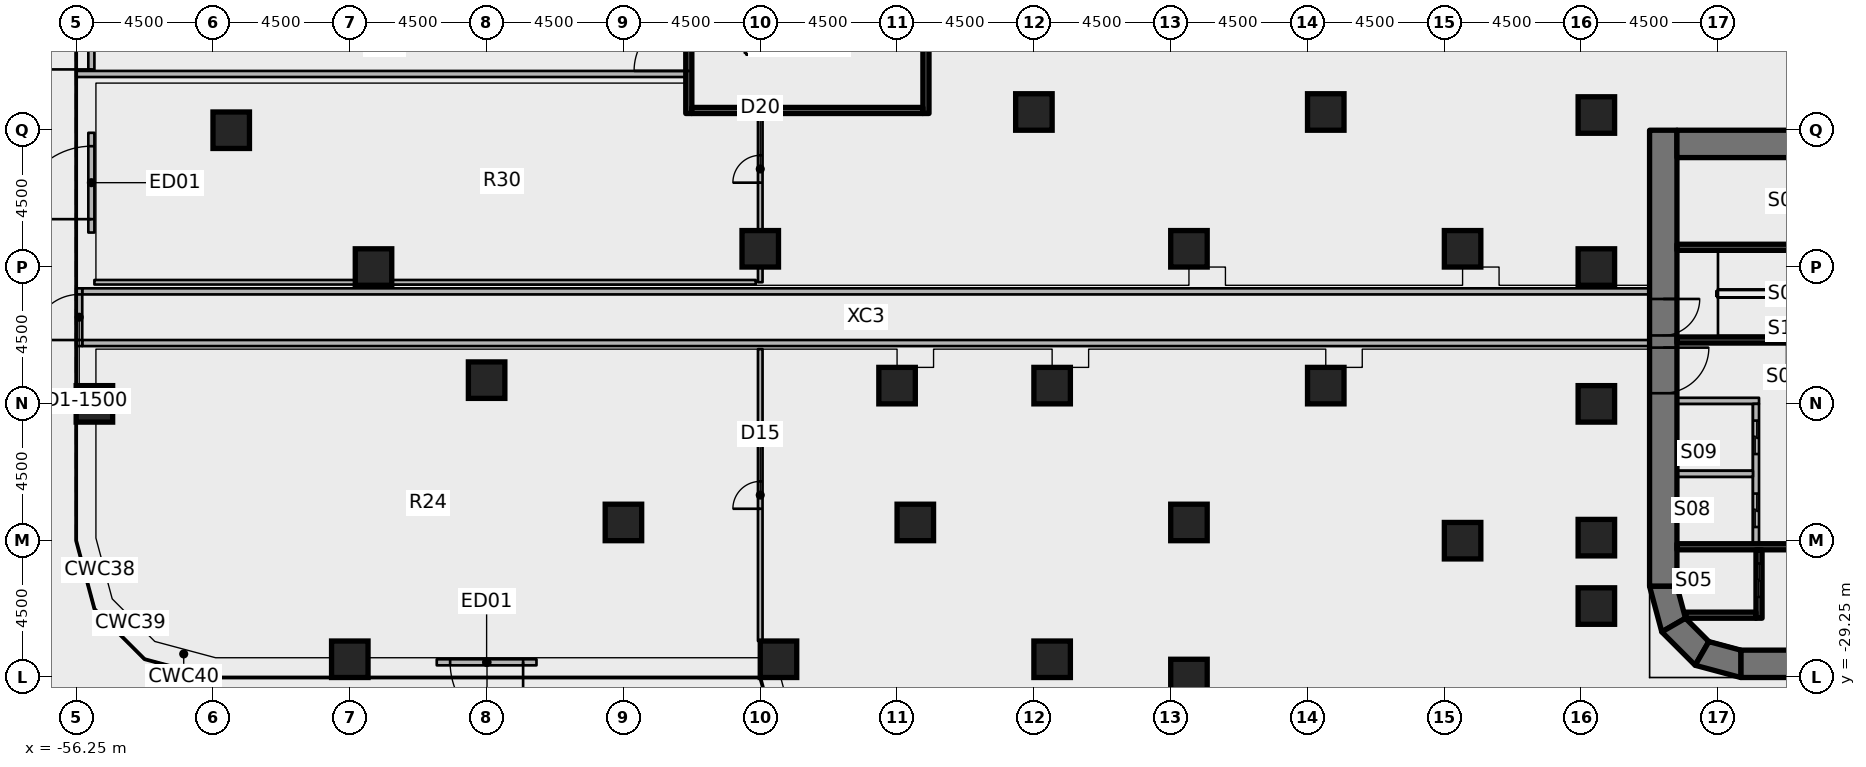
"""IFC4 building model, lengths in metres.
Left out: names, types, materials, properties, quantities, classifications, styles, units other than length and angle.
Written with IfcOpenShell. Run it as: python <this file> out.ifc"""

import sys

from ifc_helpers import new_model, si_unit, direction, frame, frame_2d, origin, origin_2d, place, context, subcontext, project, spatial, polyline, rectangle, outline, extrude, element, fill, save


model = new_model("IFC4")
c1 = context("Model", 3, precision=1e-05, world=origin(), true_north=direction((0.0, 1.0)))
c2 = subcontext(c1, "Body", "Model", "MODEL_VIEW")
j1 = project(units=[si_unit("LENGTHUNIT", "METRE"), si_unit("PLANEANGLEUNIT", "RADIAN")], contexts=[c1])
p1 = place(None, origin())
s1 = spatial("IfcSite", under=j1, at=p1, CompositionType="ELEMENT")
p2 = place(p1, origin())
s2 = spatial("IfcBuilding", under=s1, at=p2, CompositionType="ELEMENT")
p3 = place(p2, origin())
s3 = spatial("IfcBuildingStorey", under=s2, at=p3, CompositionType="ELEMENT", Elevation=0.0)
for number, where, z_axis, x_axis in (
    (1, (-55.65, -20.25, 0.0), (0.0, 0.0, 1.0), (1.0, 0.0, 0.0)),
    (2, (-51.15, -11.25, 0.0), (0.0, 0.0, 1.0), (1.0, 0.0, 0.0)),
    (3, (-47.25, -28.65, 0.0), (0.0, 0.0, 1.0), (1.0, 0.0, 0.0)),
    (4, (-46.47, -15.75, 0.0), (0.0, 0.0, 1.0), (1.0, 0.0, 0.0)),
    (5, (-42.75, -19.47, 0.0), (0.0, 0.0, 1.0), (1.0, 0.0, 0.0)),
    (6, (-38.25, -24.15, 0.0), (0.0, 0.0, 1.0), (1.0, 0.0, 0.0)),
    (7, (-33.15, -28.65, 0.0), (0.0, 0.0, 1.0), (1.0, 0.0, 0.0)),
    (8, (-33.75, -15.15, 0.0), (0.0, 0.0, 1.0), (1.0, 0.0, 0.0)),
    (9, (-28.65, -24.15, 0.0), (0.0, 0.0, 1.0), (1.0, 0.0, 0.0)),
    (10, (-29.25, -19.65, 0.0), (0.0, 0.0, 1.0), (1.0, 0.0, 0.0)),
    (11, (-24.15, -28.65, 0.0), (0.0, 0.0, 1.0), (1.0, 0.0, 0.0)),
    (12, (-24.15, -19.65, 0.0), (0.0, 0.0, 1.0), (1.0, 0.0, 0.0)),
    (13, (-24.75, -10.65, 0.0), (0.0, 0.0, 1.0), (1.0, 0.0, 0.0)),
    (14, (-19.65, -29.25, 0.0), (0.0, 0.0, 1.0), (1.0, 0.0, 0.0)),
    (15, (-19.65, -24.15, 0.0), (0.0, 0.0, 1.0), (1.0, 0.0, 0.0)),
    (16, (-19.65, -15.15, 0.0), (0.0, 0.0, 1.0), (1.0, 0.0, 0.0)),
    (17, (-15.15, -19.65, 0.0), (0.0, 0.0, 1.0), (1.0, 0.0, 0.0)),
    (18, (-15.15, -10.65, 0.0), (0.0, 0.0, 1.0), (1.0, 0.0, 0.0)),
    (19, (-10.65, -24.75, 0.0), (0.0, 0.0, 1.0), (1.0, 0.0, 0.0)),
    (20, (-10.65, -15.15, 0.0), (0.0, 0.0, 1.0), (1.0, 0.0, 0.0)),
    (21, (-6.25, -26.9, 0.0), (0.0, 0.0, 1.0), (1.0, 0.0, 0.0)),
    (22, (-6.25, -24.65, 0.0), (0.0, 0.0, 1.0), (1.0, 0.0, 0.0)),
    (23, (-6.25, -20.25, 0.0), (0.0, 0.0, 1.0), (1.0, 0.0, 0.0)),
    (24, (-6.25, -15.75, 0.0), (0.0, 0.0, 1.0), (1.0, 0.0, 0.0)),
    (25, (-6.25, -10.75, 0.0), (0.0, 0.0, 1.0), (1.0, 0.0, 0.0)),
):
    element("IfcColumn", number, at=place(p3, frame(where, z_axis=z_axis, x_axis=x_axis)), inside=s3, PredefinedType="COLUMN", context=c2, shape_type="SweptSolid", body=[
        extrude(rectangle(XDim=1.2, YDim=1.2, at=origin_2d()), origin(), (0.0, 0.0, 1.0), 6.55),
    ])
p4 = place(p3, frame((-4.05, -11.25, 0.0), z_axis=(0.0, 0.0, 1.0), x_axis=(0.0, -1.0, 0.0)))
e26 = element("IfcWall", 26, at=p4, inside=s3, PredefinedType="SHEAR", context=c2, shape_type="SweptSolid", body=[
    extrude(rectangle(XDim=15.0, YDim=0.9, at=frame_2d((7.5, 0.0))), origin(), (0.0, 0.0, 1.0), 7.0),
])
p5 = place(p4, frame((7.15, 0.0, 0.0)))
e27 = element("IfcOpeningElement", 27, at=p5, cuts=e26, PredefinedType="OPENING", context=c2, shape_type="SweptSolid", body=[
    extrude(rectangle(XDim=1.5, YDim=2.3, at=frame_2d((0.75, 1.15))), frame((0.0, 0.46, 0.0), z_axis=(0.0, -1.0, 0.0), x_axis=(1.0, 0.0, 0.0)), (0.0, 0.0, 1.0), 0.92),
])
p6 = place(p4, frame((5.55, 0.0, 0.0)))
e28 = element("IfcOpeningElement", 28, at=p6, cuts=e26, PredefinedType="OPENING", context=c2, shape_type="SweptSolid", body=[
    extrude(rectangle(XDim=1.2, YDim=2.1, at=frame_2d((0.6, 1.05))), frame((0.0, 0.46, 0.0), z_axis=(0.0, -1.0, 0.0), x_axis=(1.0, 0.0, 0.0)), (0.0, 0.0, 1.0), 0.92),
])
p7 = place(p3, frame((-3.6, -11.7, 0.0), z_axis=(0.0, 0.0, 1.0), x_axis=(1.0, 0.0, 0.0)))
e29 = element("IfcWall", 29, at=p7, inside=s3, PredefinedType="SHEAR", context=c2, shape_type="SweptSolid", body=[
    extrude(rectangle(XDim=7.2, YDim=0.9, at=frame_2d((3.6, 0.0))), origin(), (0.0, 0.0, 1.0), 7.0),
])
p8 = place(p3, frame((-1.5, -28.8, 0.0), z_axis=(0.0, 0.0, 1.0), x_axis=(1.0, 0.0, 0.0)))
e30 = element("IfcWall", 30, at=p8, inside=s3, PredefinedType="SHEAR", context=c2, shape_type="SweptSolid", body=[
    extrude(rectangle(XDim=3.0, YDim=0.9, at=frame_2d((1.5, 0.0))), origin(), (0.0, 0.0, 1.0), 7.0),
])
p9 = place(p3, origin())
e31 = element("IfcWall", 31, at=p9, inside=s3, PredefinedType="SHEAR", context=c2, shape_type="SweptSolid", body=[
    extrude(outline(polyline([(-4.5, -26.25), (-4.098, -27.75), (-3.319, -27.3), (-3.6, -26.25), (-4.5, -26.25)])), origin(), (0.0, 0.0, 1.0), 7.0),
])
p10 = place(p3, origin())
e32 = element("IfcWall", 32, at=p10, inside=s3, PredefinedType="SHEAR", context=c2, shape_type="SweptSolid", body=[
    extrude(outline(polyline([(-4.098, -27.75), (-3.0, -28.848), (-2.55, -28.069), (-3.319, -27.3), (-4.098, -27.75)])), origin(), (0.0, 0.0, 1.0), 7.0),
])
p11 = place(p3, origin())
e33 = element("IfcWall", 33, at=p11, inside=s3, PredefinedType="SHEAR", context=c2, shape_type="SweptSolid", body=[
    extrude(outline(polyline([(-3.0, -28.848), (-1.5, -29.25), (-1.5, -28.35), (-2.55, -28.069), (-3.0, -28.848)])), origin(), (0.0, 0.0, 1.0), 7.0),
])
p12 = place(p3, frame((-41.11, -28.75, 0.0), z_axis=(0.0, 0.0, 1.0), x_axis=(-1.0, 0.0, 0.0)))
e34 = element("IfcWall", 34, at=p12, inside=s3, PredefinedType="SOLIDWALL", context=c2, shape_type="SweptSolid", body=[
    extrude(rectangle(XDim=3.28, YDim=0.2, at=frame_2d((1.64, 0.0))), origin(), (0.0, 0.0, 1.0), 5.6),
])
p13 = place(p12, frame((0.44, 0.0, 0.0)))
e35 = element("IfcOpeningElement", 35, at=p13, cuts=e34, PredefinedType="OPENING", context=c2, shape_type="SweptSolid", body=[
    extrude(rectangle(XDim=2.4, YDim=2.7, at=frame_2d((1.2, 1.35))), frame((0.0, 0.11, 0.0), z_axis=(0.0, -1.0, 0.0), x_axis=(1.0, 0.0, 0.0)), (0.0, 0.0, 1.0), 0.22),
])
p14 = place(p3, frame((-55.75, -14.615, 0.0), z_axis=(0.0, 0.0, 1.0), x_axis=(0.0, 1.0, 0.0)))
e36 = element("IfcWall", 36, at=p14, inside=s3, PredefinedType="SOLIDWALL", context=c2, shape_type="SweptSolid", body=[
    extrude(rectangle(XDim=3.28, YDim=0.2, at=frame_2d((1.64, 0.0))), origin(), (0.0, 0.0, 1.0), 5.6),
])
p15 = place(p14, frame((0.44, 0.0, 0.0)))
e37 = element("IfcOpeningElement", 37, at=p15, cuts=e36, PredefinedType="OPENING", context=c2, shape_type="SweptSolid", body=[
    extrude(rectangle(XDim=2.4, YDim=2.7, at=frame_2d((1.2, 1.35))), frame((0.0, 0.11, 0.0), z_axis=(0.0, -1.0, 0.0), x_axis=(1.0, 0.0, 0.0)), (0.0, 0.0, 1.0), 0.22),
])
p16 = place(p3, frame((-55.75, -9.3, 0.0), z_axis=(0.0, 0.0, 1.0), x_axis=(0.0, 1.0, 0.0)))
e38 = element("IfcWall", 38, at=p16, inside=s3, PredefinedType="SOLIDWALL", context=c2, shape_type="SweptSolid", body=[
    extrude(rectangle(XDim=1.8, YDim=0.2, at=frame_2d((0.9, 0.0))), origin(), (0.0, 0.0, 1.0), 3.0),
])
p17 = place(p16, frame((0.05, 0.0, 0.0)))
e39 = element("IfcOpeningElement", 39, at=p17, cuts=e38, PredefinedType="OPENING", context=c2, shape_type="SweptSolid", body=[
    extrude(rectangle(XDim=1.7, YDim=2.1, at=frame_2d((0.85, 1.05))), frame((0.0, 0.11, 0.0), z_axis=(0.0, -1.0, 0.0), x_axis=(1.0, 0.0, 0.0)), (0.0, 0.0, 1.0), 0.22),
])
p18 = place(p3, frame((3.6, -24.95, 0.0), z_axis=(0.0, 0.0, 1.0), x_axis=(-1.0, 0.0, 0.0)))
e40 = element("IfcWall", 40, at=p18, inside=s3, PredefinedType="SHEAR", context=c2, shape_type="SweptSolid", body=[
    extrude(rectangle(XDim=7.2, YDim=0.2, at=frame_2d((3.6, 0.0))), origin(), (0.0, 0.0, 1.0), 6.55),
])
p19 = place(p3, frame((-0.9, -27.3, 0.0), z_axis=(0.0, 0.0, 1.0), x_axis=(0.0, 1.0, 0.0)))
e41 = element("IfcWall", 41, at=p19, inside=s3, PredefinedType="SHEAR", context=c2, shape_type="SweptSolid", body=[
    extrude(rectangle(XDim=2.25, YDim=0.2, at=frame_2d((1.125, 0.0))), origin(), (0.0, 0.0, 1.0), 6.55),
])
p20 = place(p19, frame((0.7, 0.0, 0.0)))
e42 = element("IfcOpeningElement", 42, at=p20, cuts=e41, PredefinedType="OPENING", context=c2, shape_type="SweptSolid", body=[
    extrude(rectangle(XDim=1.1, YDim=2.3, at=frame_2d((0.55, 1.15))), frame((0.0, 0.11, 0.0), z_axis=(0.0, -1.0, 0.0), x_axis=(1.0, 0.0, 0.0)), (0.0, 0.0, 1.0), 0.22),
])
p21 = place(p3, origin())
e43 = element("IfcWall", 43, at=p21, inside=s3, PredefinedType="SHEAR", context=c2, shape_type="SweptSolid", body=[
    extrude(outline(polyline([(-1.0, -27.1), (-3.341, -27.1), (-3.291, -27.284), (-3.275, -27.3), (-1.0, -27.3), (-1.0, -27.1)])), origin(), (0.0, 0.0, 1.0), 6.55),
])
for number, where, z_axis, x_axis in (
    (44, (3.6, -18.15, 0.0), (0.0, 0.0, 1.0), (-1.0, 0.0, 0.0)),
    (45, (3.6, -15.1, 0.0), (0.0, 0.0, 1.0), (-1.0, 0.0, 0.0)),
):
    element("IfcWall", number, at=place(p3, frame(where, z_axis=z_axis, x_axis=x_axis)), inside=s3, PredefinedType="SHEAR", context=c2, shape_type="SweptSolid", body=[
        extrude(rectangle(XDim=7.2, YDim=0.2, at=frame_2d((3.6, 0.0))), origin(), (0.0, 0.0, 1.0), 6.55),
    ])
p22 = place(p3, frame((-0.9, -20.15, 0.0), z_axis=(0.0, 0.0, 1.0), x_axis=(-1.0, 0.0, 0.0)))
e46 = element("IfcWall", 46, at=p22, inside=s3, PredefinedType="PARTITIONING", context=c2, shape_type="SweptSolid", body=[
    extrude(rectangle(XDim=2.7, YDim=0.2, at=frame_2d((1.35, 0.0))), origin(), (0.0, 0.0, 1.0), 6.55),
])
p23 = place(p3, frame((-1.0, -24.85, 0.0), z_axis=(0.0, 0.0, 1.0), x_axis=(0.0, 1.0, 0.0)))
e47 = element("IfcWall", 47, at=p23, inside=s3, PredefinedType="PARTITIONING", context=c2, shape_type="SweptSolid", body=[
    extrude(rectangle(XDim=4.6, YDim=0.2, at=frame_2d((2.3, 0.0))), origin(), (0.0, 0.0, 1.0), 6.55),
])
p24 = place(p23, frame((0.55, 0.0, 0.0)))
e48 = element("IfcOpeningElement", 48, at=p24, cuts=e47, PredefinedType="OPENING", context=c2, shape_type="SweptSolid", body=[
    extrude(rectangle(XDim=1.1, YDim=2.3, at=frame_2d((0.55, 1.15))), frame((0.0, 0.11, 0.0), z_axis=(0.0, -1.0, 0.0), x_axis=(1.0, 0.0, 0.0)), (0.0, 0.0, 1.0), 0.22),
])
p25 = place(p23, frame((2.95, 0.0, 0.0)))
e49 = element("IfcOpeningElement", 49, at=p25, cuts=e47, PredefinedType="OPENING", context=c2, shape_type="SweptSolid", body=[
    extrude(rectangle(XDim=1.1, YDim=2.3, at=frame_2d((0.55, 1.15))), frame((0.0, 0.11, 0.0), z_axis=(0.0, -1.0, 0.0), x_axis=(1.0, 0.0, 0.0)), (0.0, 0.0, 1.0), 0.22),
])
p26 = place(p3, frame((-1.1, -22.55, 0.0), z_axis=(0.0, 0.0, 1.0), x_axis=(-1.0, 0.0, 0.0)))
e50 = element("IfcWall", 50, at=p26, inside=s3, PredefinedType="PARTITIONING", context=c2, shape_type="SweptSolid", body=[
    extrude(rectangle(XDim=2.5, YDim=0.2, at=frame_2d((1.25, 0.0))), origin(), (0.0, 0.0, 1.0), 6.55),
])
for number, where, z_axis, x_axis in (
    (51, (-4.5, -18.25, 0.0), (0.0, 0.0, 1.0), (-1.0, 0.0, 0.0)),
    (52, (-4.5, -16.55, 0.0), (0.0, 0.0, 1.0), (-1.0, 0.0, 0.0)),
):
    element("IfcWall", number, at=place(p3, frame(where, z_axis=z_axis, x_axis=x_axis)), inside=s3, PredefinedType="PARTITIONING", context=c2, shape_type="SweptSolid", body=[
        extrude(rectangle(XDim=51.55, YDim=0.2, at=frame_2d((25.775, 0.0))), origin(), (0.0, 0.0, 1.0), 6.55),
    ])
p27 = place(p3, frame((-56.15, -18.35, 0.0), z_axis=(0.0, 0.0, 1.0), x_axis=(0.0, 1.0, 0.0)))
e53 = element("IfcWall", 53, at=p27, inside=s3, PredefinedType="PARTITIONING", context=c2, shape_type="SweptSolid", body=[
    extrude(rectangle(XDim=1.9, YDim=0.2, at=frame_2d((0.95, 0.0))), origin(), (0.0, 0.0, 1.0), 6.55),
])
p28 = place(p27, frame((0.2, 0.0, 0.0)))
e54 = element("IfcOpeningElement", 54, at=p28, cuts=e53, PredefinedType="OPENING", context=c2, shape_type="SweptSolid", body=[
    extrude(rectangle(XDim=1.5, YDim=2.1, at=frame_2d((0.75, 1.05))), frame((0.0, 0.11, 0.0), z_axis=(0.0, -1.0, 0.0), x_axis=(1.0, 0.0, 0.0)), (0.0, 0.0, 1.0), 0.22),
])
p29 = place(p3, frame((-36.1, -10.7, 0.0), z_axis=(0.0, 0.0, 1.0), x_axis=(0.0, 1.0, 0.0)))
e55 = element("IfcWall", 55, at=p29, inside=s3, PredefinedType="SHEAR", context=c2, shape_type="SweptSolid", body=[
    extrude(rectangle(XDim=4.6, YDim=0.2, at=frame_2d((2.3, 0.0))), origin(), (0.0, 0.0, 1.0), 6.55),
])
p30 = place(p29, frame((1.4, 0.0, 0.0)))
e56 = element("IfcOpeningElement", 56, at=p30, cuts=e55, PredefinedType="OPENING", context=c2, shape_type="SweptSolid", body=[
    extrude(rectangle(XDim=1.8, YDim=2.1, at=frame_2d((0.9, 1.05))), frame((0.0, 0.11, 0.0), z_axis=(0.0, -1.0, 0.0), x_axis=(1.0, 0.0, 0.0)), (0.0, 0.0, 1.0), 0.22),
])
p31 = place(p3, frame((-28.3, -10.7, 0.0), z_axis=(0.0, 0.0, 1.0), x_axis=(0.0, 1.0, 0.0)))
e57 = element("IfcWall", 57, at=p31, inside=s3, PredefinedType="SHEAR", context=c2, shape_type="SweptSolid", body=[
    extrude(rectangle(XDim=4.6, YDim=0.2, at=frame_2d((2.3, 0.0))), origin(), (0.0, 0.0, 1.0), 6.55),
])
p32 = place(p3, frame((-36.0, -10.6, 0.0), z_axis=(0.0, 0.0, 1.0), x_axis=(1.0, 0.0, 0.0)))
e58 = element("IfcWall", 58, at=p32, inside=s3, PredefinedType="SHEAR", context=c2, shape_type="SweptSolid", body=[
    extrude(rectangle(XDim=7.6, YDim=0.2, at=frame_2d((3.8, 0.0))), origin(), (0.0, 0.0, 1.0), 6.55),
])
p33 = place(p3, frame((-56.25, -9.4, 0.0), z_axis=(0.0, 0.0, 1.0), x_axis=(1.0, 0.0, 0.0)))
e59 = element("IfcWall", 59, at=p33, inside=s3, PredefinedType="PARTITIONING", context=c2, shape_type="SweptSolid", body=[
    extrude(rectangle(XDim=20.25, YDim=0.2, at=frame_2d((10.125, 0.0))), origin(), (0.0, 0.0, 1.0), 6.55),
])
p34 = place(p3, frame((-33.75, -28.05, 0.0), z_axis=(0.0, 0.0, 1.0), x_axis=(0.0, 1.0, 0.0)))
e60 = element("IfcWall", 60, at=p34, inside=s3, PredefinedType="PARTITIONING", context=c2, shape_type="SweptSolid", body=[
    extrude(rectangle(XDim=9.6, YDim=0.15, at=frame_2d((4.8, 0.0))), origin(), (0.0, 0.0, 1.0), 6.55),
])
p35 = place(p34, frame((4.35, 0.0, 0.0)))
e61 = element("IfcOpeningElement", 61, at=p35, cuts=e60, PredefinedType="OPENING", context=c2, shape_type="SweptSolid", body=[
    extrude(rectangle(XDim=0.9, YDim=2.1, at=frame_2d((0.45, 1.05))), frame((0.0, 0.085, 0.0), z_axis=(0.0, -1.0, 0.0), x_axis=(1.0, 0.0, 0.0)), (0.0, 0.0, 1.0), 0.17),
])
p36 = place(p3, frame((-33.75, -14.55, 0.0), z_axis=(0.0, 0.0, 1.0), x_axis=(0.0, 1.0, 0.0)))
e62 = element("IfcWall", 62, at=p36, inside=s3, PredefinedType="PARTITIONING", context=c2, shape_type="SweptSolid", body=[
    extrude(rectangle(XDim=4.05, YDim=0.15, at=frame_2d((2.025, 0.0))), origin(), (0.0, 0.0, 1.0), 6.55),
])
p37 = place(p36, frame((1.575, 0.0, 0.0)))
e63 = element("IfcOpeningElement", 63, at=p37, cuts=e62, PredefinedType="OPENING", context=c2, shape_type="SweptSolid", body=[
    extrude(rectangle(XDim=0.9, YDim=2.1, at=frame_2d((0.45, 1.05))), frame((0.0, 0.085, 0.0), z_axis=(0.0, -1.0, 0.0), x_axis=(1.0, 0.0, 0.0)), (0.0, 0.0, 1.0), 0.17),
])
p38 = place(p3, frame((-33.75, -15.75, 0.0), z_axis=(0.0, 0.0, 1.0), x_axis=(0.0, -1.0, 0.0)))
e64 = element("IfcWall", 64, at=p38, inside=s3, PredefinedType="PARTITIONING", context=c2, shape_type="SweptSolid", body=[
    extrude(rectangle(XDim=0.5, YDim=0.15, at=frame_2d((0.25, 0.0))), origin(), (0.0, 0.0, 1.0), 6.55),
])
p39 = place(p3, frame((-33.9, -16.25, 0.0), z_axis=(0.0, 0.0, 1.0), x_axis=(-1.0, 0.0, 0.0)))
e65 = element("IfcWall", 65, at=p39, inside=s3, PredefinedType="PARTITIONING", context=c2, shape_type="SweptSolid", body=[
    extrude(rectangle(XDim=11.97, YDim=0.15, at=frame_2d((5.985, 0.0))), origin(), (0.0, 0.0, 1.0), 6.55),
])
p40 = place(p3, frame((-47.07, -16.25, 0.0), z_axis=(0.0, 0.0, 1.0), x_axis=(-1.0, 0.0, 0.0)))
e66 = element("IfcWall", 66, at=p40, inside=s3, PredefinedType="PARTITIONING", context=c2, shape_type="SweptSolid", body=[
    extrude(rectangle(XDim=8.58, YDim=0.15, at=frame_2d((4.29, 0.0))), origin(), (0.0, 0.0, 1.0), 6.55),
])
p41 = place(p13, origin())
e67 = element("IfcDoor", 67, at=p41, inside=s3, OperationType="SINGLE_SWING_LEFT", PredefinedType="DOOR", context=c2, shape_type="SweptSolid", body=[
    extrude(rectangle(XDim=2.4, YDim=2.7, at=frame_2d((1.2, 1.35))), frame((0.0, 0.025, 0.0), z_axis=(0.0, -1.0, 0.0), x_axis=(1.0, 0.0, 0.0)), (0.0, 0.0, 1.0), 0.05),
])
fill(e35, e67)
p42 = place(p15, origin())
e68 = element("IfcDoor", 68, at=p42, inside=s3, OperationType="SINGLE_SWING_LEFT", PredefinedType="DOOR", context=c2, shape_type="SweptSolid", body=[
    extrude(rectangle(XDim=2.4, YDim=2.7, at=frame_2d((1.2, 1.35))), frame((0.0, 0.025, 0.0), z_axis=(0.0, -1.0, 0.0), x_axis=(1.0, 0.0, 0.0)), (0.0, 0.0, 1.0), 0.05),
])
fill(e37, e68)
p43 = place(p17, origin())
e69 = element("IfcDoor", 69, at=p43, inside=s3, OperationType="SINGLE_SWING_LEFT", PredefinedType="DOOR", context=c2, shape_type="SweptSolid", body=[
    extrude(rectangle(XDim=1.7, YDim=2.1, at=frame_2d((0.85, 1.05))), frame((0.0, 0.025, 0.0), z_axis=(0.0, -1.0, 0.0), x_axis=(1.0, 0.0, 0.0)), (0.0, 0.0, 1.0), 0.05),
])
fill(e39, e69)
p44 = place(p5, origin())
e70 = element("IfcDoor", 70, at=p44, inside=s3, OperationType="DOUBLE_DOOR_SINGLE_SWING", PredefinedType="DOOR", context=c2, shape_type="SweptSolid", body=[
    extrude(rectangle(XDim=1.5, YDim=2.3, at=frame_2d((0.75, 1.15))), frame((0.0, 0.025, 0.0), z_axis=(0.0, -1.0, 0.0), x_axis=(1.0, 0.0, 0.0)), (0.0, 0.0, 1.0), 0.05),
])
fill(e27, e70)
p45 = place(p6, origin())
e71 = element("IfcDoor", 71, at=p45, inside=s3, OperationType="SINGLE_SWING_LEFT", PredefinedType="DOOR", context=c2, shape_type="SweptSolid", body=[
    extrude(rectangle(XDim=1.2, YDim=2.1, at=frame_2d((0.6, 1.05))), frame((0.0, 0.025, 0.0), z_axis=(0.0, -1.0, 0.0), x_axis=(1.0, 0.0, 0.0)), (0.0, 0.0, 1.0), 0.05),
])
fill(e28, e71)
p46 = place(p20, origin())
e72 = element("IfcDoor", 72, at=p46, inside=s3, OperationType="DOUBLE_DOOR_SLIDING", PredefinedType="DOOR", context=c2, shape_type="SweptSolid", body=[
    extrude(rectangle(XDim=1.1, YDim=2.3, at=frame_2d((0.55, 1.15))), frame((0.0, 0.025, 0.0), z_axis=(0.0, -1.0, 0.0), x_axis=(1.0, 0.0, 0.0)), (0.0, 0.0, 1.0), 0.05),
])
fill(e42, e72)
p47 = place(p24, origin())
e73 = element("IfcDoor", 73, at=p47, inside=s3, OperationType="DOUBLE_DOOR_SLIDING", PredefinedType="DOOR", context=c2, shape_type="SweptSolid", body=[
    extrude(rectangle(XDim=1.1, YDim=2.3, at=frame_2d((0.55, 1.15))), frame((0.0, 0.025, 0.0), z_axis=(0.0, -1.0, 0.0), x_axis=(1.0, 0.0, 0.0)), (0.0, 0.0, 1.0), 0.05),
])
fill(e48, e73)
p48 = place(p25, origin())
e74 = element("IfcDoor", 74, at=p48, inside=s3, OperationType="DOUBLE_DOOR_SLIDING", PredefinedType="DOOR", context=c2, shape_type="SweptSolid", body=[
    extrude(rectangle(XDim=1.1, YDim=2.3, at=frame_2d((0.55, 1.15))), frame((0.0, 0.025, 0.0), z_axis=(0.0, -1.0, 0.0), x_axis=(1.0, 0.0, 0.0)), (0.0, 0.0, 1.0), 0.05),
])
fill(e49, e74)
p49 = place(p28, origin())
e75 = element("IfcDoor", 75, at=p49, inside=s3, OperationType="DOUBLE_DOOR_DOUBLE_SWING", PredefinedType="DOOR", context=c2, shape_type="SweptSolid", body=[
    extrude(rectangle(XDim=1.5, YDim=2.1, at=frame_2d((0.75, 1.05))), frame((0.0, 0.025, 0.0), z_axis=(0.0, -1.0, 0.0), x_axis=(1.0, 0.0, 0.0)), (0.0, 0.0, 1.0), 0.05),
])
fill(e54, e75)
p50 = place(p30, origin())
e76 = element("IfcDoor", 76, at=p50, inside=s3, OperationType="DOUBLE_DOOR_SINGLE_SWING", PredefinedType="DOOR", context=c2, shape_type="SweptSolid", body=[
    extrude(rectangle(XDim=1.8, YDim=2.1, at=frame_2d((0.9, 1.05))), frame((0.0, 0.025, 0.0), z_axis=(0.0, -1.0, 0.0), x_axis=(1.0, 0.0, 0.0)), (0.0, 0.0, 1.0), 0.05),
])
fill(e56, e76)
p51 = place(p35, origin())
e77 = element("IfcDoor", 77, at=p51, inside=s3, OperationType="SINGLE_SWING_LEFT", PredefinedType="DOOR", context=c2, shape_type="SweptSolid", body=[
    extrude(rectangle(XDim=0.9, YDim=2.1, at=frame_2d((0.45, 1.05))), frame((0.0, 0.025, 0.0), z_axis=(0.0, -1.0, 0.0), x_axis=(1.0, 0.0, 0.0)), (0.0, 0.0, 1.0), 0.05),
])
fill(e61, e77)
p52 = place(p37, origin())
e78 = element("IfcDoor", 78, at=p52, inside=s3, OperationType="SINGLE_SWING_LEFT", PredefinedType="DOOR", context=c2, shape_type="SweptSolid", body=[
    extrude(rectangle(XDim=0.9, YDim=2.1, at=frame_2d((0.45, 1.05))), frame((0.0, 0.025, 0.0), z_axis=(0.0, -1.0, 0.0), x_axis=(1.0, 0.0, 0.0)), (0.0, 0.0, 1.0), 0.05),
])
fill(e63, e78)
save(model, sys.argv[1])
